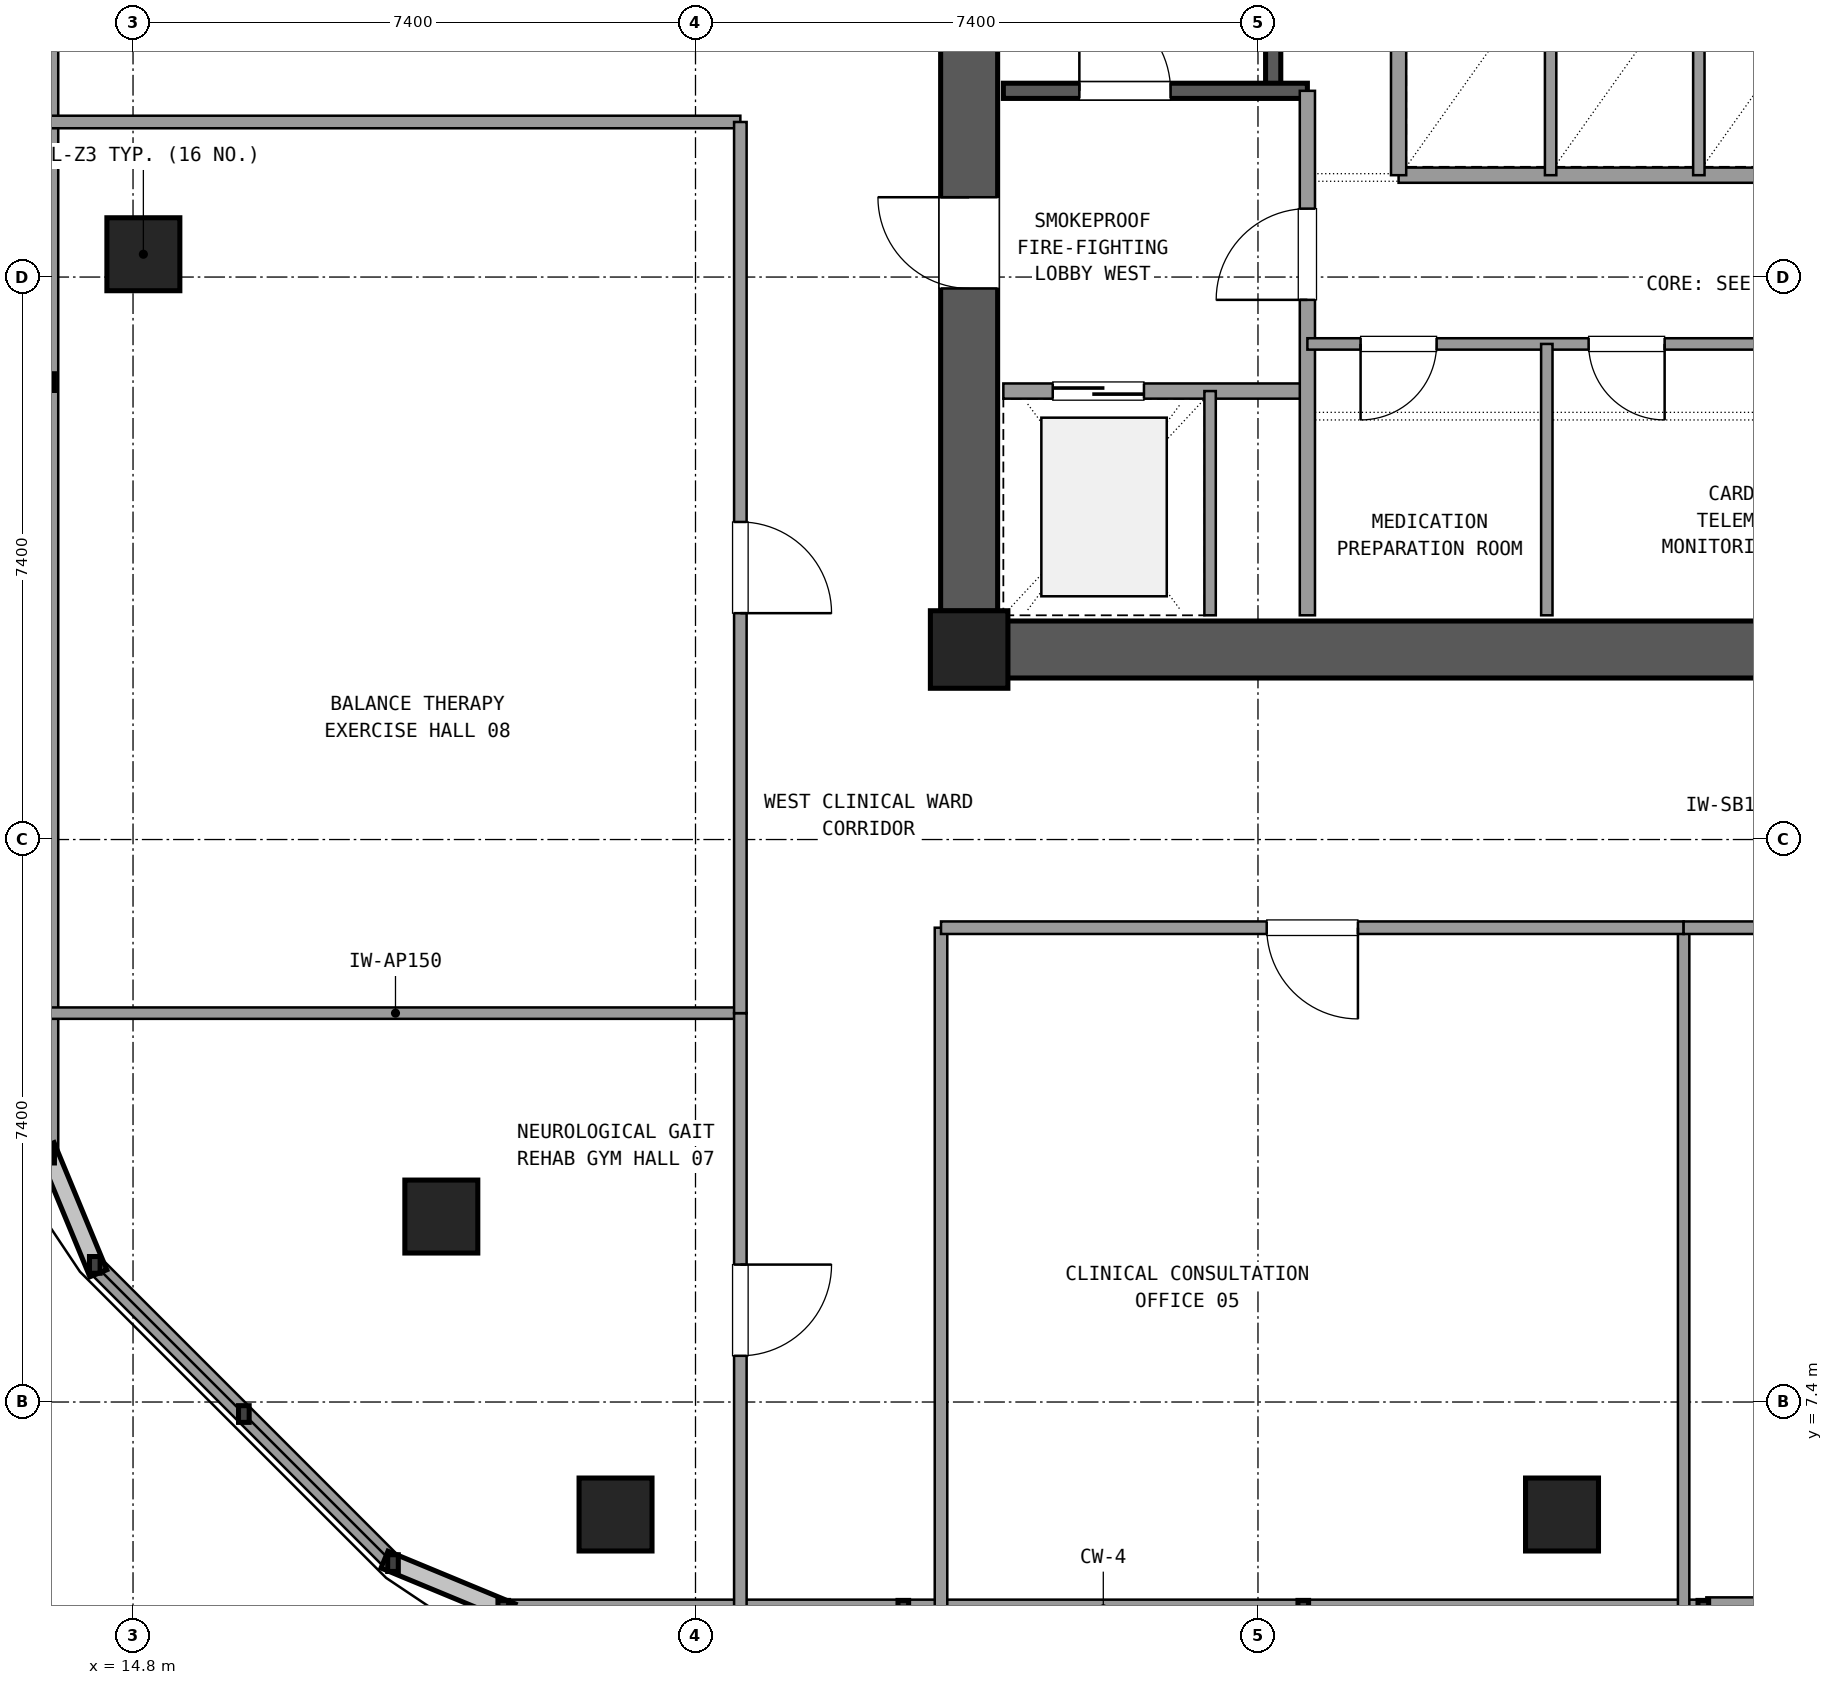
"""IFC4 building model, lengths in metres.
Left out: names, types, materials, properties, quantities, classifications, styles, units other than length and angle.
Written with IfcOpenShell. Run it as: python <this file> out.ifc"""

import sys

from ifc_helpers import new_model, si_unit, direction, frame, frame_2d, origin, origin_2d, place, context, subcontext, project, spatial, rectangle, extrude, element, fill, save


model = new_model("IFC4")
c1 = context("Model", 3, precision=1e-05, world=origin(), true_north=direction((0.0, 1.0)))
c2 = subcontext(c1, "Body", "Model", "MODEL_VIEW")
j1 = project(units=[si_unit("LENGTHUNIT", "METRE"), si_unit("PLANEANGLEUNIT", "RADIAN")], contexts=[c1])
p1 = place(None, origin())
s1 = spatial("IfcSite", under=j1, at=p1, CompositionType="ELEMENT")
p2 = place(p1, origin())
s2 = spatial("IfcBuilding", under=s1, at=p2, CompositionType="ELEMENT")
p3 = place(p2, frame((0.0, 0.0, 167.22)))
s3 = spatial("IfcBuildingStorey", under=s2, at=p3, CompositionType="ELEMENT", Elevation=167.22)
p4 = place(p3, frame((25.8, 17.3, 0.0), z_axis=(0.0, 0.0, 1.0), x_axis=(1.0, 0.0, 0.0)))
e1 = element("IfcColumn", 1, at=p4, inside=s3, PredefinedType="COLUMN", context=c2, shape_type="SweptSolid", body=[
    extrude(rectangle(XDim=1.02, YDim=1.02, at=origin_2d()), origin(), (0.0, 0.0, 1.0), 3.6),
])
p5 = place(p3, frame((26.305, 17.3, 0.0), z_axis=(0.0, 0.0, 1.0), x_axis=(1.0, 0.0, 0.0)))
e2 = element("IfcWall", 2, at=p5, inside=s3, PredefinedType="SHEAR", context=c2, shape_type="SweptSolid", body=[
    extrude(rectangle(XDim=10.19, YDim=0.75, at=frame_2d((5.095, 0.0))), origin(), (0.0, 0.0, 1.0), 3.32),
])
p6 = place(p3, frame((25.8, 25.395, 0.0), z_axis=(0.0, 0.0, 1.0), x_axis=(0.0, -1.0, 0.0)))
e3 = element("IfcWall", 3, at=p6, inside=s3, PredefinedType="SHEAR", context=c2, shape_type="SweptSolid", body=[
    extrude(rectangle(XDim=7.59, YDim=0.75, at=frame_2d((3.795, 0.0))), origin(), (0.0, 0.0, 1.0), 3.32),
])
p7 = place(p6, frame((2.145, 0.0, 0.0)))
e4 = element("IfcOpeningElement", 4, at=p7, cuts=e3, PredefinedType="OPENING", context=c2, shape_type="SweptSolid", body=[
    extrude(rectangle(XDim=1.2, YDim=2.15, at=frame_2d((0.6, 1.075))), frame((0.0, 0.385, 0.0), z_axis=(0.0, -1.0, 0.0), x_axis=(1.0, 0.0, 0.0)), (0.0, 0.0, 1.0), 0.77),
])
for number, where, z_axis, x_axis in (
    (5, (14.936, 22.5, 0.0), (0.0, 0.0, 1.0), (1.0, 0.0, 0.0)),
    (6, (18.856, 9.84, 0.0), (0.0, 0.0, 1.0), (1.0, 0.0, 0.0)),
    (7, (21.148, 5.92, 0.0), (0.0, 0.0, 1.0), (1.0, 0.0, 0.0)),
    (8, (33.6, 5.92, 0.0), (0.0, 0.0, 1.0), (1.0, 0.0, 0.0)),
):
    element("IfcColumn", number, at=place(p3, frame(where, z_axis=z_axis, x_axis=x_axis)), inside=s3, PredefinedType="COLUMN", context=c2, shape_type="SweptSolid", body=[
        extrude(rectangle(XDim=0.96, YDim=0.96, at=origin_2d()), origin(), (0.0, 0.0, 1.0), 3.6),
    ])
p8 = place(p3, frame((35.499, 4.68, 0.0), z_axis=(0.0, 0.0, 1.0), x_axis=(1.0, 0.0, 0.0)))
e9 = element("IfcWall", 9, at=p8, inside=s3, PredefinedType="SOLIDWALL", context=c2, shape_type="SweptSolid", body=[
    extrude(rectangle(XDim=3.0, YDim=0.3, at=frame_2d((1.5, 0.0))), origin(), (0.0, 0.0, 1.0), 2.67),
])
p9 = place(p8, frame((0.9, 0.0, 0.0)))
e10 = element("IfcOpeningElement", 10, at=p9, cuts=e9, PredefinedType="OPENING", context=c2, shape_type="SweptSolid", body=[
    extrude(rectangle(XDim=1.2, YDim=2.2, at=frame_2d((0.6, 1.1))), frame((0.0, 0.16, 0.0), z_axis=(0.0, -1.0, 0.0), x_axis=(1.0, 0.0, 0.0)), (0.0, 0.0, 1.0), 0.32),
])
p10 = place(p3, frame((19.671, 4.68, 0.0), z_axis=(0.0, 0.0, 1.0), x_axis=(1.0, 0.0, 0.0)))
e11 = element("IfcWall", 11, at=p10, inside=s3, PredefinedType="SOLIDWALL", context=c2, shape_type="SweptSolid", body=[
    extrude(rectangle(XDim=15.788, YDim=0.24, at=frame_2d((7.894, 0.0))), origin(), (0.0, 0.0, 1.0), 0.85),
])
p11 = place(p3, frame((13.696, 41.145, 0.0), z_axis=(0.0, 0.0, 1.0), x_axis=(0.0, -1.0, 0.0)))
e12 = element("IfcWall", 12, at=p11, inside=s3, PredefinedType="SOLIDWALL", context=c2, shape_type="SweptSolid", body=[
    extrude(rectangle(XDim=30.49, YDim=0.24, at=frame_2d((15.245, 0.0))), origin(), (0.0, 0.0, 1.0), 0.85),
])
p12 = place(p3, frame((14.297, 9.204, 0.0), z_axis=(0.0, 0.0, 1.0), x_axis=(0.707084777957, -0.707128783731, 0.0)))
e13 = element("IfcWall", 13, at=p12, inside=s3, PredefinedType="SOLIDWALL", context=c2, shape_type="SweptSolid", body=[
    extrude(rectangle(XDim=5.548, YDim=0.24, at=frame_2d((2.774, 0.0))), origin(), (0.0, 0.0, 1.0), 0.85),
])
p13 = place(p3, frame((29.8, 24.65, 0.0), z_axis=(0.0, 0.0, 1.0), x_axis=(0.0, 1.0, 0.0)))
e14 = element("IfcWall", 14, at=p13, inside=s3, PredefinedType="SHEAR", context=c2, shape_type="SweptSolid", body=[
    extrude(rectangle(XDim=9.4, YDim=0.2, at=frame_2d((4.7, 0.0))), origin(), (0.0, 0.0, 1.0), 3.32),
])
p14 = place(p3, frame((26.25, 24.65, 0.0), z_axis=(0.0, 0.0, 1.0), x_axis=(1.0, 0.0, 0.0)))
e15 = element("IfcWall", 15, at=p14, inside=s3, PredefinedType="SHEAR", context=c2, shape_type="SweptSolid", body=[
    extrude(rectangle(XDim=4.0, YDim=0.2, at=frame_2d((2.0, 0.0))), origin(), (0.0, 0.0, 1.0), 3.32),
])
p15 = place(p14, frame((1.0, 0.0, 0.0)))
e16 = element("IfcOpeningElement", 16, at=p15, cuts=e15, PredefinedType="OPENING", context=c2, shape_type="SweptSolid", body=[
    extrude(rectangle(XDim=1.2, YDim=2.15, at=frame_2d((0.6, 1.075))), frame((0.0, 0.11, 0.0), z_axis=(0.0, -1.0, 0.0), x_axis=(1.0, 0.0, 0.0)), (0.0, 0.0, 1.0), 0.22),
])
p16 = place(p3, frame((26.25, 20.7, 0.0), z_axis=(0.0, 0.0, 1.0), x_axis=(1.0, 0.0, 0.0)))
e17 = element("IfcWall", 17, at=p16, inside=s3, PredefinedType="SOLIDWALL", context=c2, shape_type="SweptSolid", body=[
    extrude(rectangle(XDim=4.0, YDim=0.2, at=frame_2d((2.0, 0.0))), origin(), (0.0, 0.0, 1.0), 2.61),
])
p17 = place(p16, frame((0.65, 0.0, 0.0)))
e18 = element("IfcOpeningElement", 18, at=p17, cuts=e17, PredefinedType="OPENING", context=c2, shape_type="SweptSolid", body=[
    extrude(rectangle(XDim=1.2, YDim=2.15, at=frame_2d((0.6, 1.075))), frame((0.0, 0.11, 0.0), z_axis=(0.0, -1.0, 0.0), x_axis=(1.0, 0.0, 0.0)), (0.0, 0.0, 1.0), 0.22),
])
p18 = place(p3, frame((30.25, 17.75, 0.0), z_axis=(0.0, 0.0, 1.0), x_axis=(0.0, 1.0, 0.0)))
e19 = element("IfcWall", 19, at=p18, inside=s3, PredefinedType="SOLIDWALL", context=c2, shape_type="SweptSolid", body=[
    extrude(rectangle(XDim=6.9, YDim=0.2, at=frame_2d((3.45, 0.0))), origin(), (0.0, 0.0, 1.0), 2.61),
])
p19 = place(p18, frame((4.15, 0.0, 0.0)))
e20 = element("IfcOpeningElement", 20, at=p19, cuts=e19, PredefinedType="OPENING", context=c2, shape_type="SweptSolid", body=[
    extrude(rectangle(XDim=1.2, YDim=2.15, at=frame_2d((0.6, 1.075))), frame((0.0, 0.11, 0.0), z_axis=(0.0, -1.0, 0.0), x_axis=(1.0, 0.0, 0.0)), (0.0, 0.0, 1.0), 0.22),
])
p20 = place(p3, frame((28.97, 17.75, 0.0), z_axis=(0.0, 0.0, 1.0), x_axis=(0.0, 1.0, 0.0)))
e21 = element("IfcWall", 21, at=p20, inside=s3, PredefinedType="PARTITIONING", context=c2, shape_type="SweptSolid", body=[
    extrude(rectangle(XDim=2.95, YDim=0.15, at=frame_2d((1.475, 0.0))), origin(), (0.0, 0.0, 1.0), 2.61),
])
p21 = place(p3, frame((30.25, 21.32, 0.0), z_axis=(0.0, 0.0, 1.0), x_axis=(1.0, 0.0, 0.0)))
e22 = element("IfcWall", 22, at=p21, inside=s3, PredefinedType="PARTITIONING", context=c2, shape_type="SweptSolid", body=[
    extrude(rectangle(XDim=7.0, YDim=0.15, at=frame_2d((3.5, 0.0))), origin(), (0.0, 0.0, 1.0), 2.61),
])
p22 = place(p21, frame((0.7, 0.0, 0.0)))
e23 = element("IfcOpeningElement", 23, at=p22, cuts=e22, PredefinedType="OPENING", context=c2, shape_type="SweptSolid", body=[
    extrude(rectangle(XDim=1.0, YDim=2.15, at=frame_2d((0.5, 1.075))), frame((0.0, 0.085, 0.0), z_axis=(0.0, -1.0, 0.0), x_axis=(1.0, 0.0, 0.0)), (0.0, 0.0, 1.0), 0.17),
])
p23 = place(p21, frame((3.7, 0.0, 0.0)))
e24 = element("IfcOpeningElement", 24, at=p23, cuts=e22, PredefinedType="OPENING", context=c2, shape_type="SweptSolid", body=[
    extrude(rectangle(XDim=1.0, YDim=2.15, at=frame_2d((0.5, 1.075))), frame((0.0, 0.085, 0.0), z_axis=(0.0, -1.0, 0.0), x_axis=(1.0, 0.0, 0.0)), (0.0, 0.0, 1.0), 0.17),
])
p24 = place(p3, frame((33.4, 17.75, 0.0), z_axis=(0.0, 0.0, 1.0), x_axis=(0.0, 1.0, 0.0)))
e25 = element("IfcWall", 25, at=p24, inside=s3, PredefinedType="PARTITIONING", context=c2, shape_type="SweptSolid", body=[
    extrude(rectangle(XDim=3.57, YDim=0.15, at=frame_2d((1.785, 0.0))), origin(), (0.0, 0.0, 1.0), 2.61),
])
p25 = place(p3, frame((31.45, 23.54, 0.0), z_axis=(0.0, 0.0, 1.0), x_axis=(1.0, 0.0, 0.0)))
e26 = element("IfcWall", 26, at=p25, inside=s3, PredefinedType="SOLIDWALL", context=c2, shape_type="SweptSolid", body=[
    extrude(rectangle(XDim=5.9, YDim=0.2, at=frame_2d((2.95, 0.0))), origin(), (0.0, 0.0, 1.0), 2.61),
])
p26 = place(p3, frame((31.45, 23.54, 0.0), z_axis=(0.0, 0.0, 1.0), x_axis=(0.0, 1.0, 0.0)))
e27 = element("IfcWall", 27, at=p26, inside=s3, PredefinedType="SOLIDWALL", context=c2, shape_type="SweptSolid", body=[
    extrude(rectangle(XDim=2.81, YDim=0.2, at=frame_2d((1.405, 0.0))), origin(), (0.0, 0.0, 1.0), 2.61),
])
for number, where, z_axis, x_axis in (
    (28, (33.45, 23.54, 0.0), (0.0, 0.0, 1.0), (0.0, 1.0, 0.0)),
    (29, (35.4, 23.54, 0.0), (0.0, 0.0, 1.0), (0.0, 1.0, 0.0)),
):
    element("IfcWall", number, at=place(p3, frame(where, z_axis=z_axis, x_axis=x_axis)), inside=s3, PredefinedType="PARTITIONING", context=c2, shape_type="SweptSolid", body=[
        extrude(rectangle(XDim=2.81, YDim=0.15, at=frame_2d((1.405, 0.0))), origin(), (0.0, 0.0, 1.0), 2.61),
    ])
p27 = place(p3, frame((25.43, 4.7, 0.0), z_axis=(0.0, 0.0, 1.0), x_axis=(0.0, 1.0, 0.0)))
e30 = element("IfcWall", 30, at=p27, inside=s3, PredefinedType="PARTITIONING", context=c2, shape_type="SweptSolid", body=[
    extrude(rectangle(XDim=8.94, YDim=0.165, at=frame_2d((4.47, 0.0))), origin(), (0.0, 0.0, 1.0), 2.61),
])
p28 = place(p3, frame((13.716, 24.24, 0.0), z_axis=(0.0, 0.0, 1.0), x_axis=(1.0, 0.0, 0.0)))
e31 = element("IfcWall", 31, at=p28, inside=s3, PredefinedType="PARTITIONING", context=c2, shape_type="SweptSolid", body=[
    extrude(rectangle(XDim=9.074, YDim=0.165, at=frame_2d((4.537, 0.0))), origin(), (0.0, 0.0, 1.0), 2.61),
])
p29 = place(p3, frame((35.2, 13.64, 0.0), z_axis=(0.0, 0.0, 1.0), x_axis=(0.0, -1.0, 0.0)))
e32 = element("IfcWall", 32, at=p29, inside=s3, PredefinedType="PARTITIONING", context=c2, shape_type="SweptSolid", body=[
    extrude(rectangle(XDim=8.94, YDim=0.15, at=frame_2d((4.47, 0.0))), origin(), (0.0, 0.0, 1.0), 2.61),
])
p30 = place(p3, frame((25.43, 13.64, 0.0), z_axis=(0.0, 0.0, 1.0), x_axis=(1.0, 0.0, 0.0)))
e33 = element("IfcWall", 33, at=p30, inside=s3, PredefinedType="PARTITIONING", context=c2, shape_type="SweptSolid", body=[
    extrude(rectangle(XDim=9.77, YDim=0.165, at=frame_2d((4.885, 0.0))), origin(), (0.0, 0.0, 1.0), 2.61),
])
p31 = place(p30, frame((4.285, 0.0, 0.0)))
e34 = element("IfcOpeningElement", 34, at=p31, cuts=e33, PredefinedType="OPENING", context=c2, shape_type="SweptSolid", body=[
    extrude(rectangle(XDim=1.2, YDim=2.15, at=frame_2d((0.6, 1.075))), frame((0.0, 0.093, 0.0), z_axis=(0.0, -1.0, 0.0), x_axis=(1.0, 0.0, 0.0)), (0.0, 0.0, 1.0), 0.185),
])
p32 = place(p3, frame((35.2, 13.64, 0.0), z_axis=(0.0, 0.0, 1.0), x_axis=(1.0, 0.0, 0.0)))
e35 = element("IfcWall", 35, at=p32, inside=s3, PredefinedType="PARTITIONING", context=c2, shape_type="SweptSolid", body=[
    extrude(rectangle(XDim=13.37, YDim=0.165, at=frame_2d((6.685, 0.0))), origin(), (0.0, 0.0, 1.0), 2.61),
])
p33 = place(p32, frame((6.085, 0.0, 0.0)))
e36 = element("IfcOpeningElement", 36, at=p33, cuts=e35, PredefinedType="OPENING", context=c2, shape_type="SweptSolid", body=[
    extrude(rectangle(XDim=1.2, YDim=2.15, at=frame_2d((0.6, 1.075))), frame((0.0, 0.093, 0.0), z_axis=(0.0, -1.0, 0.0), x_axis=(1.0, 0.0, 0.0)), (0.0, 0.0, 1.0), 0.185),
])
p34 = place(p3, frame((22.79, 12.516, 0.0), z_axis=(0.0, 0.0, 1.0), x_axis=(-1.0, 0.0, 0.0)))
e37 = element("IfcWall", 37, at=p34, inside=s3, PredefinedType="PARTITIONING", context=c2, shape_type="SweptSolid", body=[
    extrude(rectangle(XDim=9.074, YDim=0.15, at=frame_2d((4.537, 0.0))), origin(), (0.0, 0.0, 1.0), 2.61),
])
p35 = place(p3, frame((22.79, 4.7, 0.0), z_axis=(0.0, 0.0, 1.0), x_axis=(0.0, 1.0, 0.0)))
e38 = element("IfcWall", 38, at=p35, inside=s3, PredefinedType="PARTITIONING", context=c2, shape_type="SweptSolid", body=[
    extrude(rectangle(XDim=7.816, YDim=0.165, at=frame_2d((3.908, 0.0))), origin(), (0.0, 0.0, 1.0), 2.61),
])
p36 = place(p35, frame((3.308, 0.0, 0.0)))
e39 = element("IfcOpeningElement", 39, at=p36, cuts=e38, PredefinedType="OPENING", context=c2, shape_type="SweptSolid", body=[
    extrude(rectangle(XDim=1.2, YDim=2.15, at=frame_2d((0.6, 1.075))), frame((0.0, 0.093, 0.0), z_axis=(0.0, -1.0, 0.0), x_axis=(1.0, 0.0, 0.0)), (0.0, 0.0, 1.0), 0.185),
])
p37 = place(p3, frame((22.79, 12.516, 0.0), z_axis=(0.0, 0.0, 1.0), x_axis=(0.0, 1.0, 0.0)))
e40 = element("IfcWall", 40, at=p37, inside=s3, PredefinedType="PARTITIONING", context=c2, shape_type="SweptSolid", body=[
    extrude(rectangle(XDim=11.724, YDim=0.165, at=frame_2d((5.862, 0.0))), origin(), (0.0, 0.0, 1.0), 2.61),
])
p38 = place(p37, frame((5.262, 0.0, 0.0)))
e41 = element("IfcOpeningElement", 41, at=p38, cuts=e40, PredefinedType="OPENING", context=c2, shape_type="SweptSolid", body=[
    extrude(rectangle(XDim=1.2, YDim=2.15, at=frame_2d((0.6, 1.075))), frame((0.0, 0.093, 0.0), z_axis=(0.0, -1.0, 0.0), x_axis=(1.0, 0.0, 0.0)), (0.0, 0.0, 1.0), 0.185),
])
p39 = place(p15, origin())
e42 = element("IfcDoor", 42, at=p39, inside=s3, OperationType="SINGLE_SWING_LEFT", PredefinedType="DOOR", context=c2, shape_type="SweptSolid", body=[
    extrude(rectangle(XDim=1.2, YDim=2.15, at=frame_2d((0.6, 1.075))), frame((0.0, 0.025, 0.0), z_axis=(0.0, -1.0, 0.0), x_axis=(1.0, 0.0, 0.0)), (0.0, 0.0, 1.0), 0.05),
])
fill(e16, e42)
p40 = place(p17, origin())
e43 = element("IfcDoor", 43, at=p40, inside=s3, OperationType="SLIDING_TO_LEFT", PredefinedType="DOOR", context=c2, shape_type="SweptSolid", body=[
    extrude(rectangle(XDim=1.2, YDim=2.15, at=frame_2d((0.6, 1.075))), frame((0.0, 0.025, 0.0), z_axis=(0.0, -1.0, 0.0), x_axis=(1.0, 0.0, 0.0)), (0.0, 0.0, 1.0), 0.05),
])
fill(e18, e43)
p41 = place(p19, origin())
e44 = element("IfcDoor", 44, at=p41, inside=s3, OperationType="SINGLE_SWING_LEFT", PredefinedType="DOOR", context=c2, shape_type="SweptSolid", body=[
    extrude(rectangle(XDim=1.2, YDim=2.15, at=frame_2d((0.6, 1.075))), frame((0.0, 0.025, 0.0), z_axis=(0.0, -1.0, 0.0), x_axis=(1.0, 0.0, 0.0)), (0.0, 0.0, 1.0), 0.05),
])
fill(e20, e44)
p42 = place(p7, frame((1.2, 0.0, 0.0), z_axis=(0.0, 0.0, 1.0), x_axis=(-1.0, 0.0, 0.0)))
e45 = element("IfcDoor", 45, at=p42, inside=s3, OperationType="SINGLE_SWING_LEFT", PredefinedType="DOOR", context=c2, shape_type="SweptSolid", body=[
    extrude(rectangle(XDim=1.2, YDim=2.15, at=frame_2d((0.6, 1.075))), frame((0.0, 0.025, 0.0), z_axis=(0.0, -1.0, 0.0), x_axis=(1.0, 0.0, 0.0)), (0.0, 0.0, 1.0), 0.05),
])
fill(e4, e45)
p43 = place(p22, frame((1.0, 0.0, 0.0), z_axis=(0.0, 0.0, 1.0), x_axis=(-1.0, 0.0, 0.0)))
e46 = element("IfcDoor", 46, at=p43, inside=s3, OperationType="SINGLE_SWING_LEFT", PredefinedType="DOOR", context=c2, shape_type="SweptSolid", body=[
    extrude(rectangle(XDim=1.0, YDim=2.15, at=frame_2d((0.5, 1.075))), frame((0.0, 0.025, 0.0), z_axis=(0.0, -1.0, 0.0), x_axis=(1.0, 0.0, 0.0)), (0.0, 0.0, 1.0), 0.05),
])
fill(e23, e46)
p44 = place(p23, frame((1.0, 0.0, 0.0), z_axis=(0.0, 0.0, 1.0), x_axis=(-1.0, 0.0, 0.0)))
e47 = element("IfcDoor", 47, at=p44, inside=s3, OperationType="SINGLE_SWING_RIGHT", PredefinedType="DOOR", context=c2, shape_type="SweptSolid", body=[
    extrude(rectangle(XDim=1.0, YDim=2.15, at=frame_2d((0.5, 1.075))), frame((0.0, 0.025, 0.0), z_axis=(0.0, -1.0, 0.0), x_axis=(1.0, 0.0, 0.0)), (0.0, 0.0, 1.0), 0.05),
])
fill(e24, e47)
p45 = place(p31, frame((1.2, 0.0, 0.0), z_axis=(0.0, 0.0, 1.0), x_axis=(-1.0, 0.0, 0.0)))
e48 = element("IfcDoor", 48, at=p45, inside=s3, OperationType="SINGLE_SWING_RIGHT", PredefinedType="DOOR", context=c2, shape_type="SweptSolid", body=[
    extrude(rectangle(XDim=1.2, YDim=2.15, at=frame_2d((0.6, 1.075))), frame((0.0, 0.025, 0.0), z_axis=(0.0, -1.0, 0.0), x_axis=(1.0, 0.0, 0.0)), (0.0, 0.0, 1.0), 0.05),
])
fill(e34, e48)
p46 = place(p36, frame((1.2, 0.0, 0.0), z_axis=(0.0, 0.0, 1.0), x_axis=(-1.0, 0.0, 0.0)))
e49 = element("IfcDoor", 49, at=p46, inside=s3, OperationType="SINGLE_SWING_RIGHT", PredefinedType="DOOR", context=c2, shape_type="SweptSolid", body=[
    extrude(rectangle(XDim=1.2, YDim=2.15, at=frame_2d((0.6, 1.075))), frame((0.0, 0.025, 0.0), z_axis=(0.0, -1.0, 0.0), x_axis=(1.0, 0.0, 0.0)), (0.0, 0.0, 1.0), 0.05),
])
fill(e39, e49)
p47 = place(p38, frame((1.2, 0.0, 0.0), z_axis=(0.0, 0.0, 1.0), x_axis=(-1.0, 0.0, 0.0)))
e50 = element("IfcDoor", 50, at=p47, inside=s3, OperationType="SINGLE_SWING_LEFT", PredefinedType="DOOR", context=c2, shape_type="SweptSolid", body=[
    extrude(rectangle(XDim=1.2, YDim=2.15, at=frame_2d((0.6, 1.075))), frame((0.0, 0.025, 0.0), z_axis=(0.0, -1.0, 0.0), x_axis=(1.0, 0.0, 0.0)), (0.0, 0.0, 1.0), 0.05),
])
fill(e41, e50)
save(model, sys.argv[1])
